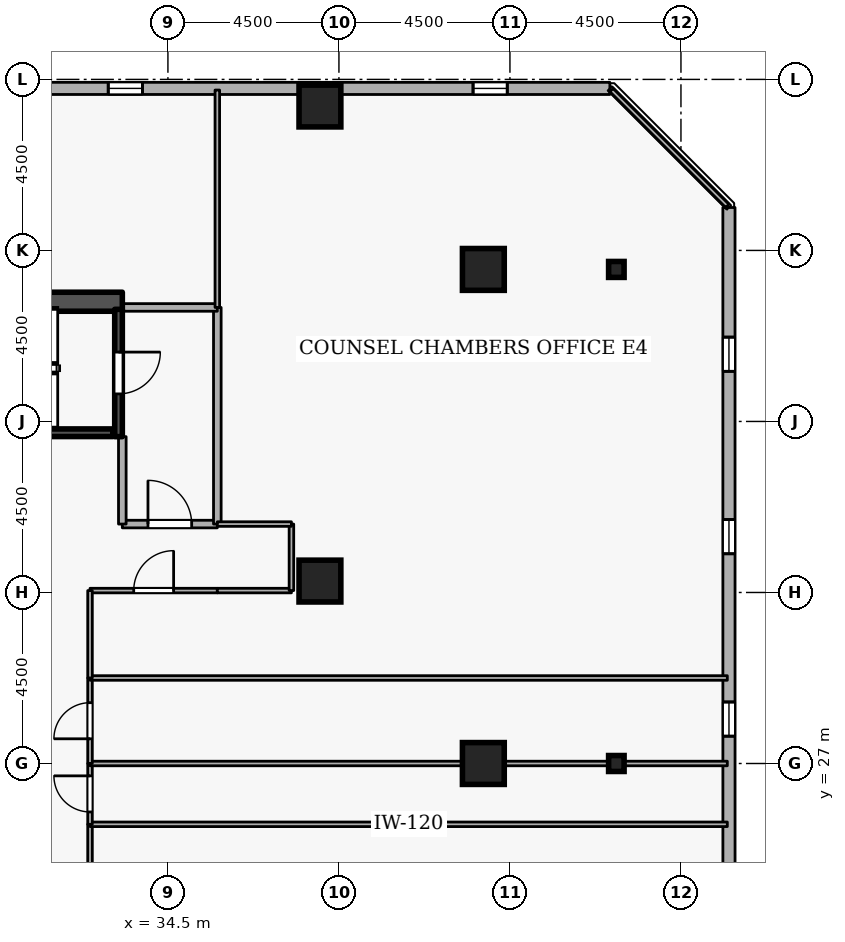
"""IFC4 building model, lengths in metres.
Left out: names, types, materials, properties, quantities, classifications, styles, units other than length and angle.
Written with IfcOpenShell. Run it as: python <this file> out.ifc"""

import sys

from ifc_helpers import new_model, si_unit, direction, frame, frame_2d, origin, origin_2d, place, context, subcontext, project, spatial, rectangle, i_section, extrude, element, fill, save


model = new_model("IFC4")
c1 = context("Model", 3, precision=1e-05, world=origin(), true_north=direction((0.0, 1.0)))
c2 = subcontext(c1, "Body", "Model", "MODEL_VIEW")
j1 = project(units=[si_unit("LENGTHUNIT", "METRE"), si_unit("PLANEANGLEUNIT", "RADIAN")], contexts=[c1])
p1 = place(None, origin())
s1 = spatial("IfcSite", under=j1, at=p1, CompositionType="ELEMENT")
p2 = place(p1, origin())
s2 = spatial("IfcBuilding", under=s1, at=p2, CompositionType="ELEMENT")
p3 = place(p2, frame((0.0, 0.0, 163.5)))
s3 = spatial("IfcBuildingStorey", under=s2, at=p3, CompositionType="ELEMENT", Elevation=163.5)
p4 = place(p3, frame((17.7, 39.15, 0.0), z_axis=(0.0, 0.0, 1.0), x_axis=(1.0, 0.0, 0.0)))
e1 = element("IfcWall", 1, at=p4, inside=s3, PredefinedType="SHEAR", context=c2, shape_type="SweptSolid", body=[
    extrude(rectangle(XDim=15.6, YDim=0.5, at=frame_2d((7.8, 0.0))), origin(), (0.0, 0.0, 1.0), 3.6),
])
for number, where, z_axis, x_axis in (
    (2, (42.8, 27.0, 0.0), (0.0, 0.0, 1.0), (1.0, 0.0, 0.0)),
    (3, (42.8, 40.0, 0.0), (0.0, 0.0, 1.0), (1.0, 0.0, 0.0)),
    (4, (38.5, 44.3, 0.0), (0.0, 0.0, 1.0), (1.0, 0.0, 0.0)),
    (5, (38.5, 31.8, 0.0), (0.0, 0.0, 1.0), (1.0, 0.0, 0.0)),
):
    element("IfcColumn", number, at=place(p3, frame(where, z_axis=z_axis, x_axis=x_axis)), inside=s3, PredefinedType="COLUMN", context=c2, shape_type="SweptSolid", body=[
        extrude(rectangle(XDim=1.1, YDim=1.1, at=origin_2d()), origin(), (0.0, 0.0, 1.0), 3.6),
    ])
for number, where, z_axis, x_axis in (
    (6, (46.3, 27.0, 0.0), (0.0, 0.0, 1.0), (1.0, 0.0, 0.0)),
    (7, (46.3, 40.0, 0.0), (0.0, 0.0, 1.0), (1.0, 0.0, 0.0)),
):
    element("IfcColumn", number, at=place(p3, frame(where, z_axis=z_axis, x_axis=x_axis)), inside=s3, PredefinedType="COLUMN", context=c2, shape_type="SweptSolid", body=[
        extrude(i_section(OverallWidth=0.407, OverallDepth=0.419, WebThickness=0.031, FlangeThickness=0.049, FilletRadius=0.015, at=origin_2d()), origin(), (0.0, 0.0, 1.0), 3.6),
    ])
p5 = place(p3, frame((49.265, 5.819, 0.0), z_axis=(0.0, 0.0, 1.0), x_axis=(-5.4540124e-05, 0.999999998513, 0.0)))
e8 = element("IfcWall", 8, at=p5, inside=s3, PredefinedType="STANDARD", context=c2, shape_type="SweptSolid", body=[
    extrude(rectangle(XDim=35.811, YDim=0.32, at=frame_2d((17.905, 0.0))), origin(), (0.0, 0.0, 1.0), 2.7),
])
p6 = place(p5, frame((2.7, 0.0, 0.72)))
e9 = element("IfcOpeningElement", 9, at=p6, cuts=e8, PredefinedType="OPENING", context=c2, shape_type="SweptSolid", body=[
    extrude(rectangle(XDim=0.9, YDim=1.75, at=frame_2d((0.45, 0.875))), frame((0.0, 0.17, 0.0), z_axis=(0.0, -1.0, 0.0), x_axis=(1.0, 0.0, 0.0)), (0.0, 0.0, 1.0), 0.34),
])
p7 = place(p5, frame((7.5, 0.0, 0.72)))
e10 = element("IfcOpeningElement", 10, at=p7, cuts=e8, PredefinedType="OPENING", context=c2, shape_type="SweptSolid", body=[
    extrude(rectangle(XDim=0.9, YDim=1.75, at=frame_2d((0.45, 0.875))), frame((0.0, 0.17, 0.0), z_axis=(0.0, -1.0, 0.0), x_axis=(1.0, 0.0, 0.0)), (0.0, 0.0, 1.0), 0.34),
])
p8 = place(p5, frame((12.3, 0.0, 0.72)))
e11 = element("IfcOpeningElement", 11, at=p8, cuts=e8, PredefinedType="OPENING", context=c2, shape_type="SweptSolid", body=[
    extrude(rectangle(XDim=0.9, YDim=1.75, at=frame_2d((0.45, 0.875))), frame((0.0, 0.17, 0.0), z_axis=(0.0, -1.0, 0.0), x_axis=(1.0, 0.0, 0.0)), (0.0, 0.0, 1.0), 0.34),
])
p9 = place(p5, frame((17.1, 0.0, 0.72)))
e12 = element("IfcOpeningElement", 12, at=p9, cuts=e8, PredefinedType="OPENING", context=c2, shape_type="SweptSolid", body=[
    extrude(rectangle(XDim=0.9, YDim=1.75, at=frame_2d((0.45, 0.875))), frame((0.0, 0.17, 0.0), z_axis=(0.0, -1.0, 0.0), x_axis=(1.0, 0.0, 0.0)), (0.0, 0.0, 1.0), 0.34),
])
p10 = place(p5, frame((21.9, 0.0, 0.72)))
e13 = element("IfcOpeningElement", 13, at=p10, cuts=e8, PredefinedType="OPENING", context=c2, shape_type="SweptSolid", body=[
    extrude(rectangle(XDim=0.9, YDim=1.75, at=frame_2d((0.45, 0.875))), frame((0.0, 0.17, 0.0), z_axis=(0.0, -1.0, 0.0), x_axis=(1.0, 0.0, 0.0)), (0.0, 0.0, 1.0), 0.34),
])
p11 = place(p5, frame((26.7, 0.0, 0.72)))
e14 = element("IfcOpeningElement", 14, at=p11, cuts=e8, PredefinedType="OPENING", context=c2, shape_type="SweptSolid", body=[
    extrude(rectangle(XDim=0.9, YDim=1.75, at=frame_2d((0.45, 0.875))), frame((0.0, 0.17, 0.0), z_axis=(0.0, -1.0, 0.0), x_axis=(1.0, 0.0, 0.0)), (0.0, 0.0, 1.0), 0.34),
])
p12 = place(p5, frame((31.5, 0.0, 0.72)))
e15 = element("IfcOpeningElement", 15, at=p12, cuts=e8, PredefinedType="OPENING", context=c2, shape_type="SweptSolid", body=[
    extrude(rectangle(XDim=0.9, YDim=1.75, at=frame_2d((0.45, 0.875))), frame((0.0, 0.17, 0.0), z_axis=(0.0, -1.0, 0.0), x_axis=(1.0, 0.0, 0.0)), (0.0, 0.0, 1.0), 0.34),
])
p13 = place(p3, frame((46.129, 44.763, 0.0), z_axis=(0.0, 0.0, 1.0), x_axis=(-0.999999998513, 5.4540124e-05, 0.0)))
e16 = element("IfcWall", 16, at=p13, inside=s3, PredefinedType="STANDARD", context=c2, shape_type="SweptSolid", body=[
    extrude(rectangle(XDim=35.811, YDim=0.32, at=frame_2d((17.905, 0.0))), origin(), (0.0, 0.0, 1.0), 2.7),
])
p14 = place(p13, frame((2.7, 0.0, 0.72)))
e17 = element("IfcOpeningElement", 17, at=p14, cuts=e16, PredefinedType="OPENING", context=c2, shape_type="SweptSolid", body=[
    extrude(rectangle(XDim=0.9, YDim=1.75, at=frame_2d((0.45, 0.875))), frame((0.0, 0.17, 0.0), z_axis=(0.0, -1.0, 0.0), x_axis=(1.0, 0.0, 0.0)), (0.0, 0.0, 1.0), 0.34),
])
p15 = place(p13, frame((12.3, 0.0, 0.72)))
e18 = element("IfcOpeningElement", 18, at=p15, cuts=e16, PredefinedType="OPENING", context=c2, shape_type="SweptSolid", body=[
    extrude(rectangle(XDim=0.9, YDim=1.75, at=frame_2d((0.45, 0.875))), frame((0.0, 0.17, 0.0), z_axis=(0.0, -1.0, 0.0), x_axis=(1.0, 0.0, 0.0)), (0.0, 0.0, 1.0), 0.34),
])
p16 = place(p13, frame((17.1, 0.0, 0.72)))
e19 = element("IfcOpeningElement", 19, at=p16, cuts=e16, PredefinedType="OPENING", context=c2, shape_type="SweptSolid", body=[
    extrude(rectangle(XDim=0.9, YDim=1.75, at=frame_2d((0.45, 0.875))), frame((0.0, 0.17, 0.0), z_axis=(0.0, -1.0, 0.0), x_axis=(1.0, 0.0, 0.0)), (0.0, 0.0, 1.0), 0.34),
])
p17 = place(p13, frame((21.9, 0.0, 0.72)))
e20 = element("IfcOpeningElement", 20, at=p17, cuts=e16, PredefinedType="OPENING", context=c2, shape_type="SweptSolid", body=[
    extrude(rectangle(XDim=0.9, YDim=1.75, at=frame_2d((0.45, 0.875))), frame((0.0, 0.17, 0.0), z_axis=(0.0, -1.0, 0.0), x_axis=(1.0, 0.0, 0.0)), (0.0, 0.0, 1.0), 0.34),
])
p18 = place(p13, frame((26.7, 0.0, 0.72)))
e21 = element("IfcOpeningElement", 21, at=p18, cuts=e16, PredefinedType="OPENING", context=c2, shape_type="SweptSolid", body=[
    extrude(rectangle(XDim=0.9, YDim=1.75, at=frame_2d((0.45, 0.875))), frame((0.0, 0.17, 0.0), z_axis=(0.0, -1.0, 0.0), x_axis=(1.0, 0.0, 0.0)), (0.0, 0.0, 1.0), 0.34),
])
p19 = place(p13, frame((31.5, 0.0, 0.72)))
e22 = element("IfcOpeningElement", 22, at=p19, cuts=e16, PredefinedType="OPENING", context=c2, shape_type="SweptSolid", body=[
    extrude(rectangle(XDim=0.9, YDim=1.75, at=frame_2d((0.45, 0.875))), frame((0.0, 0.17, 0.0), z_axis=(0.0, -1.0, 0.0), x_axis=(1.0, 0.0, 0.0)), (0.0, 0.0, 1.0), 0.34),
])
p20 = place(p3, frame((33.2, 38.95, 0.0), z_axis=(0.0, 0.0, 1.0), x_axis=(0.0, -1.0, 0.0)))
e23 = element("IfcWall", 23, at=p20, inside=s3, PredefinedType="SHEAR", context=c2, shape_type="SweptSolid", body=[
    extrude(rectangle(XDim=3.35, YDim=0.2, at=frame_2d((1.675, 0.0))), origin(), (0.0, 0.0, 1.0), 3.6),
])
p21 = place(p20, frame((1.125, 0.0, 0.0)))
e24 = element("IfcOpeningElement", 24, at=p21, cuts=e23, PredefinedType="OPENING", context=c2, shape_type="SweptSolid", body=[
    extrude(rectangle(XDim=1.1, YDim=2.1, at=frame_2d((0.55, 1.05))), frame((0.0, 0.11, 0.0), z_axis=(0.0, -1.0, 0.0), x_axis=(1.0, 0.0, 0.0)), (0.0, 0.0, 1.0), 0.22),
])
p22 = place(p3, frame((25.95, 35.703, 0.0), z_axis=(0.0, 0.0, 1.0), x_axis=(1.0, 0.0, 0.0)))
e25 = element("IfcWall", 25, at=p22, inside=s3, PredefinedType="SHEAR", context=c2, shape_type="SweptSolid", body=[
    extrude(rectangle(XDim=7.1, YDim=0.2, at=frame_2d((3.55, 0.0))), origin(), (0.0, 0.0, 1.0), 3.6),
])
p23 = place(p3, frame((33.3, 33.3, 0.0), z_axis=(0.0, 0.0, 1.0), x_axis=(1.0, 0.0, 0.0)))
e26 = element("IfcWall", 26, at=p23, inside=s3, PredefinedType="STANDARD", context=c2, shape_type="SweptSolid", body=[
    extrude(rectangle(XDim=2.5, YDim=0.2, at=frame_2d((1.25, 0.0))), origin(), (0.0, 0.0, 1.0), 3.34),
])
p24 = place(p23, frame((0.675, 0.0, 0.0)))
e27 = element("IfcOpeningElement", 27, at=p24, cuts=e26, PredefinedType="OPENING", context=c2, shape_type="SweptSolid", body=[
    extrude(rectangle(XDim=1.15, YDim=2.1, at=frame_2d((0.575, 1.05))), frame((0.0, 0.11, 0.0), z_axis=(0.0, -1.0, 0.0), x_axis=(1.0, 0.0, 0.0)), (0.0, 0.0, 1.0), 0.22),
])
p25 = place(p3, frame((35.8, 33.3, 0.0), z_axis=(0.0, 0.0, 1.0), x_axis=(0.0, 1.0, 0.0)))
e28 = element("IfcWall", 28, at=p25, inside=s3, PredefinedType="STANDARD", context=c2, shape_type="SweptSolid", body=[
    extrude(rectangle(XDim=5.7, YDim=0.2, at=frame_2d((2.85, 0.0))), origin(), (0.0, 0.0, 1.0), 3.34),
])
p26 = place(p3, frame((35.8, 39.0, 0.0), z_axis=(0.0, 0.0, 1.0), x_axis=(-1.0, 0.0, 0.0)))
e29 = element("IfcWall", 29, at=p26, inside=s3, PredefinedType="STANDARD", context=c2, shape_type="SweptSolid", body=[
    extrude(rectangle(XDim=2.5, YDim=0.2, at=frame_2d((1.25, 0.0))), origin(), (0.0, 0.0, 1.0), 3.34),
])
p27 = place(p3, frame((33.3, 35.6, 0.0), z_axis=(0.0, 0.0, 1.0), x_axis=(0.0, -1.0, 0.0)))
e30 = element("IfcWall", 30, at=p27, inside=s3, PredefinedType="STANDARD", context=c2, shape_type="SweptSolid", body=[
    extrude(rectangle(XDim=2.3, YDim=0.2, at=frame_2d((1.15, 0.0))), origin(), (0.0, 0.0, 1.0), 2.545),
])
p28 = place(p3, frame((32.45, 22.45, 0.0), z_axis=(0.0, 0.0, 1.0), x_axis=(0.0, 1.0, 0.0)))
e31 = element("IfcWall", 31, at=p28, inside=s3, PredefinedType="PARTITIONING", context=c2, shape_type="SweptSolid", body=[
    extrude(rectangle(XDim=2.95, YDim=0.12, at=frame_2d((1.475, 0.0))), origin(), (0.0, 0.0, 1.0), 3.34),
])
p29 = place(p3, frame((32.45, 25.4, 0.0), z_axis=(0.0, 0.0, 1.0), x_axis=(1.0, 0.0, 0.0)))
e32 = element("IfcWall", 32, at=p29, inside=s3, PredefinedType="PARTITIONING", context=c2, shape_type="SweptSolid", body=[
    extrude(rectangle(XDim=16.77, YDim=0.12, at=frame_2d((8.385, 0.0))), origin(), (0.0, 0.0, 1.0), 3.34),
])
p30 = place(p3, frame((32.45, 25.4, 0.0), z_axis=(0.0, 0.0, 1.0), x_axis=(0.0, 1.0, 0.0)))
e33 = element("IfcWall", 33, at=p30, inside=s3, PredefinedType="PARTITIONING", context=c2, shape_type="SweptSolid", body=[
    extrude(rectangle(XDim=1.6, YDim=0.12, at=frame_2d((0.8, 0.0))), origin(), (0.0, 0.0, 1.0), 3.34),
])
p31 = place(p30, frame((0.325, 0.0, 0.0)))
e34 = element("IfcOpeningElement", 34, at=p31, cuts=e33, PredefinedType="OPENING", context=c2, shape_type="SweptSolid", body=[
    extrude(rectangle(XDim=0.95, YDim=2.1, at=frame_2d((0.475, 1.05))), frame((0.0, 0.07, 0.0), z_axis=(0.0, -1.0, 0.0), x_axis=(1.0, 0.0, 0.0)), (0.0, 0.0, 1.0), 0.14),
])
p32 = place(p3, frame((32.45, 27.0, 0.0), z_axis=(0.0, 0.0, 1.0), x_axis=(1.0, 0.0, 0.0)))
e35 = element("IfcWall", 35, at=p32, inside=s3, PredefinedType="PARTITIONING", context=c2, shape_type="SweptSolid", body=[
    extrude(rectangle(XDim=16.77, YDim=0.12, at=frame_2d((8.385, 0.0))), origin(), (0.0, 0.0, 1.0), 2.878),
])
p33 = place(p3, frame((32.45, 27.0, 0.0), z_axis=(0.0, 0.0, 1.0), x_axis=(0.0, 1.0, 0.0)))
e36 = element("IfcWall", 36, at=p33, inside=s3, PredefinedType="PARTITIONING", context=c2, shape_type="SweptSolid", body=[
    extrude(rectangle(XDim=2.25, YDim=0.12, at=frame_2d((1.125, 0.0))), origin(), (0.0, 0.0, 1.0), 3.34),
])
p34 = place(p33, frame((0.65, 0.0, 0.0)))
e37 = element("IfcOpeningElement", 37, at=p34, cuts=e36, PredefinedType="OPENING", context=c2, shape_type="SweptSolid", body=[
    extrude(rectangle(XDim=0.95, YDim=2.1, at=frame_2d((0.475, 1.05))), frame((0.0, 0.07, 0.0), z_axis=(0.0, -1.0, 0.0), x_axis=(1.0, 0.0, 0.0)), (0.0, 0.0, 1.0), 0.14),
])
p35 = place(p3, frame((32.45, 29.25, 0.0), z_axis=(0.0, 0.0, 1.0), x_axis=(1.0, 0.0, 0.0)))
e38 = element("IfcWall", 38, at=p35, inside=s3, PredefinedType="PARTITIONING", context=c2, shape_type="SweptSolid", body=[
    extrude(rectangle(XDim=16.77, YDim=0.12, at=frame_2d((8.385, 0.0))), origin(), (0.0, 0.0, 1.0), 3.34),
])
p36 = place(p3, frame((32.45, 31.55, 0.0), z_axis=(0.0, 0.0, 1.0), x_axis=(1.0, 0.0, 0.0)))
e39 = element("IfcWall", 39, at=p36, inside=s3, PredefinedType="PARTITIONING", context=c2, shape_type="SweptSolid", body=[
    extrude(rectangle(XDim=3.35, YDim=0.12, at=frame_2d((1.675, 0.0))), origin(), (0.0, 0.0, 1.0), 3.34),
])
p37 = place(p36, frame((1.15, 0.0, 0.0)))
e40 = element("IfcOpeningElement", 40, at=p37, cuts=e39, PredefinedType="OPENING", context=c2, shape_type="SweptSolid", body=[
    extrude(rectangle(XDim=1.05, YDim=2.1, at=frame_2d((0.525, 1.05))), frame((0.0, 0.07, 0.0), z_axis=(0.0, -1.0, 0.0), x_axis=(1.0, 0.0, 0.0)), (0.0, 0.0, 1.0), 0.14),
])
p38 = place(p3, frame((35.8, 31.55, 0.0), z_axis=(0.0, 0.0, 1.0), x_axis=(1.0, 0.0, 0.0)))
e41 = element("IfcWall", 41, at=p38, inside=s3, PredefinedType="PARTITIONING", context=c2, shape_type="SweptSolid", body=[
    extrude(rectangle(XDim=1.95, YDim=0.12, at=frame_2d((0.975, 0.0))), origin(), (0.0, 0.0, 1.0), 3.34),
])
p39 = place(p3, frame((37.75, 31.55, 0.0), z_axis=(0.0, 0.0, 1.0), x_axis=(0.0, 1.0, 0.0)))
e42 = element("IfcWall", 42, at=p39, inside=s3, PredefinedType="PARTITIONING", context=c2, shape_type="SweptSolid", body=[
    extrude(rectangle(XDim=1.75, YDim=0.12, at=frame_2d((0.875, 0.0))), origin(), (0.0, 0.0, 1.0), 3.34),
])
p40 = place(p3, frame((37.75, 33.3, 0.0), z_axis=(0.0, 0.0, 1.0), x_axis=(-1.0, 0.0, 0.0)))
e43 = element("IfcWall", 43, at=p40, inside=s3, PredefinedType="PARTITIONING", context=c2, shape_type="SweptSolid", body=[
    extrude(rectangle(XDim=1.95, YDim=0.12, at=frame_2d((0.975, 0.0))), origin(), (0.0, 0.0, 1.0), 3.34),
])
p41 = place(p3, frame((35.8, 39.0, 0.0), z_axis=(0.0, 0.0, 1.0), x_axis=(0.0, 1.0, 0.0)))
e44 = element("IfcWall", 44, at=p41, inside=s3, PredefinedType="PARTITIONING", context=c2, shape_type="SweptSolid", body=[
    extrude(rectangle(XDim=5.72, YDim=0.12, at=frame_2d((2.86, 0.0))), origin(), (0.0, 0.0, 1.0), 3.34),
])
p42 = place(p3, frame((46.171, 44.72, 0.0), z_axis=(0.0, 0.0, 1.0), x_axis=(0.707106781187, -0.707106781187, 0.0)))
e45 = element("IfcWall", 45, at=p42, inside=s3, PredefinedType="PARTITIONING", context=c2, shape_type="SweptSolid", body=[
    extrude(rectangle(XDim=4.311, YDim=0.12, at=frame_2d((2.156, 0.0))), origin(), (0.0, 0.0, 1.0), 3.34),
])
p43 = place(p3, frame((32.45, 29.25, 0.0), z_axis=(0.0, 0.0, 1.0), x_axis=(0.0, 1.0, 0.0)))
e46 = element("IfcWall", 46, at=p43, inside=s3, PredefinedType="PARTITIONING", context=c2, shape_type="SweptSolid", body=[
    extrude(rectangle(XDim=2.3, YDim=0.12, at=frame_2d((1.15, 0.0))), origin(), (0.0, 0.0, 1.0), 3.34),
])
p44 = place(p10, origin())
e47 = element("IfcWindow", 47, at=p44, inside=s3, PartitioningType="SINGLE_PANEL", PredefinedType="WINDOW", context=c2, shape_type="SweptSolid", body=[
    extrude(rectangle(XDim=0.9, YDim=1.75, at=frame_2d((0.45, 0.875))), frame((0.0, 0.03, 0.0), z_axis=(0.0, -1.0, 0.0), x_axis=(1.0, 0.0, 0.0)), (0.0, 0.0, 1.0), 0.06),
])
fill(e13, e47)
p45 = place(p11, origin())
e48 = element("IfcWindow", 48, at=p45, inside=s3, PartitioningType="SINGLE_PANEL", PredefinedType="WINDOW", context=c2, shape_type="SweptSolid", body=[
    extrude(rectangle(XDim=0.9, YDim=1.75, at=frame_2d((0.45, 0.875))), frame((0.0, 0.03, 0.0), z_axis=(0.0, -1.0, 0.0), x_axis=(1.0, 0.0, 0.0)), (0.0, 0.0, 1.0), 0.06),
])
fill(e14, e48)
p46 = place(p12, origin())
e49 = element("IfcWindow", 49, at=p46, inside=s3, PartitioningType="SINGLE_PANEL", PredefinedType="WINDOW", context=c2, shape_type="SweptSolid", body=[
    extrude(rectangle(XDim=0.9, YDim=1.75, at=frame_2d((0.45, 0.875))), frame((0.0, 0.03, 0.0), z_axis=(0.0, -1.0, 0.0), x_axis=(1.0, 0.0, 0.0)), (0.0, 0.0, 1.0), 0.06),
])
fill(e15, e49)
p47 = place(p14, origin())
e50 = element("IfcWindow", 50, at=p47, inside=s3, PartitioningType="SINGLE_PANEL", PredefinedType="WINDOW", context=c2, shape_type="SweptSolid", body=[
    extrude(rectangle(XDim=0.9, YDim=1.75, at=frame_2d((0.45, 0.875))), frame((0.0, 0.03, 0.0), z_axis=(0.0, -1.0, 0.0), x_axis=(1.0, 0.0, 0.0)), (0.0, 0.0, 1.0), 0.06),
])
fill(e17, e50)
p48 = place(p15, origin())
e51 = element("IfcWindow", 51, at=p48, inside=s3, PartitioningType="SINGLE_PANEL", PredefinedType="WINDOW", context=c2, shape_type="SweptSolid", body=[
    extrude(rectangle(XDim=0.9, YDim=1.75, at=frame_2d((0.45, 0.875))), frame((0.0, 0.03, 0.0), z_axis=(0.0, -1.0, 0.0), x_axis=(1.0, 0.0, 0.0)), (0.0, 0.0, 1.0), 0.06),
])
fill(e18, e51)
p49 = place(p21, origin())
e52 = element("IfcDoor", 52, at=p49, inside=s3, OperationType="SINGLE_SWING_LEFT", PredefinedType="DOOR", context=c2, shape_type="SweptSolid", body=[
    extrude(rectangle(XDim=1.1, YDim=2.1, at=frame_2d((0.55, 1.05))), frame((0.0, 0.025, 0.0), z_axis=(0.0, -1.0, 0.0), x_axis=(1.0, 0.0, 0.0)), (0.0, 0.0, 1.0), 0.05),
])
fill(e24, e52)
p50 = place(p24, origin())
e53 = element("IfcDoor", 53, at=p50, inside=s3, OperationType="SINGLE_SWING_LEFT", PredefinedType="DOOR", context=c2, shape_type="SweptSolid", body=[
    extrude(rectangle(XDim=1.15, YDim=2.1, at=frame_2d((0.575, 1.05))), frame((0.0, 0.025, 0.0), z_axis=(0.0, -1.0, 0.0), x_axis=(1.0, 0.0, 0.0)), (0.0, 0.0, 1.0), 0.05),
])
fill(e27, e53)
p51 = place(p31, origin())
e54 = element("IfcDoor", 54, at=p51, inside=s3, OperationType="SINGLE_SWING_RIGHT", PredefinedType="DOOR", context=c2, shape_type="SweptSolid", body=[
    extrude(rectangle(XDim=0.95, YDim=2.1, at=frame_2d((0.475, 1.05))), frame((0.0, 0.025, 0.0), z_axis=(0.0, -1.0, 0.0), x_axis=(1.0, 0.0, 0.0)), (0.0, 0.0, 1.0), 0.05),
])
fill(e34, e54)
p52 = place(p34, origin())
e55 = element("IfcDoor", 55, at=p52, inside=s3, OperationType="SINGLE_SWING_LEFT", PredefinedType="DOOR", context=c2, shape_type="SweptSolid", body=[
    extrude(rectangle(XDim=0.95, YDim=2.1, at=frame_2d((0.475, 1.05))), frame((0.0, 0.025, 0.0), z_axis=(0.0, -1.0, 0.0), x_axis=(1.0, 0.0, 0.0)), (0.0, 0.0, 1.0), 0.05),
])
fill(e37, e55)
p53 = place(p37, origin())
e56 = element("IfcDoor", 56, at=p53, inside=s3, OperationType="SINGLE_SWING_RIGHT", PredefinedType="DOOR", context=c2, shape_type="SweptSolid", body=[
    extrude(rectangle(XDim=1.05, YDim=2.1, at=frame_2d((0.525, 1.05))), frame((0.0, 0.025, 0.0), z_axis=(0.0, -1.0, 0.0), x_axis=(1.0, 0.0, 0.0)), (0.0, 0.0, 1.0), 0.05),
])
fill(e40, e56)
save(model, sys.argv[1])
